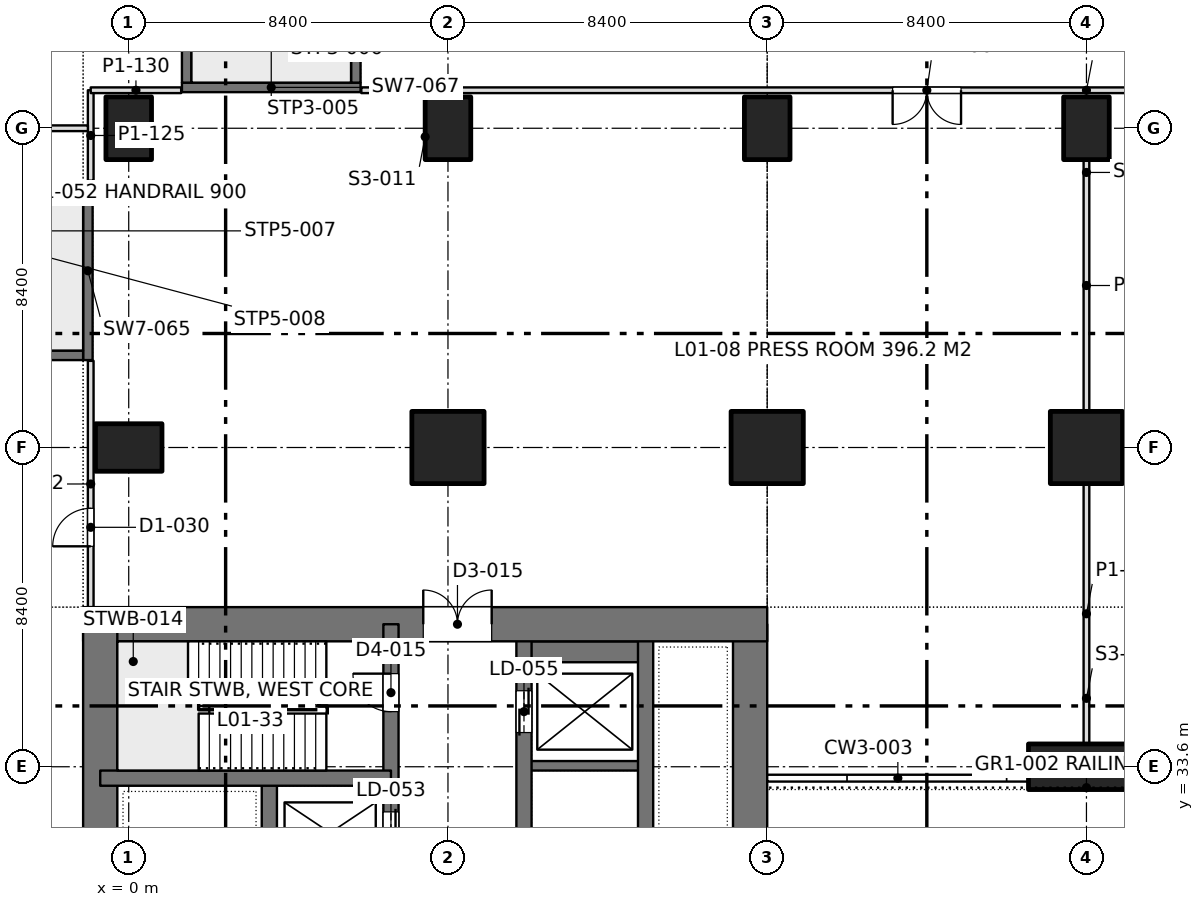
"""IFC4 building model, lengths in metres.
Left out: names, types, materials, properties, quantities, classifications, styles, units other than length and angle.
Written with IfcOpenShell. Run it as: python <this file> out.ifc"""

import sys

from ifc_helpers import new_model, si_unit, direction, frame, frame_2d, origin, origin_2d, place, context, subcontext, project, spatial, rectangle, extrude, element, fill, save


model = new_model("IFC4")
c1 = context("Model", 3, precision=1e-05, world=origin(), true_north=direction((0.0, 1.0)))
c2 = subcontext(c1, "Body", "Model", "MODEL_VIEW")
j1 = project(units=[si_unit("LENGTHUNIT", "METRE"), si_unit("PLANEANGLEUNIT", "RADIAN")], contexts=[c1])
p1 = place(None, origin())
s1 = spatial("IfcSite", under=j1, at=p1, CompositionType="ELEMENT")
p2 = place(p1, origin())
s2 = spatial("IfcBuilding", under=s1, at=p2, CompositionType="ELEMENT")
p3 = place(p2, frame((0.0, 0.0, 5.4)))
s3 = spatial("IfcBuildingStorey", under=s2, at=p3, CompositionType="ELEMENT", Elevation=5.4)
p4 = place(p3, frame((0.0, 42.0, 0.0), z_axis=(0.0, 0.0, 1.0), x_axis=(0.0, 1.0, 0.0)))
e1 = element("IfcColumn", 1, at=p4, inside=s3, PredefinedType="COLUMN", context=c2, shape_type="SweptSolid", body=[
    extrude(rectangle(XDim=1.25, YDim=1.75, at=origin_2d()), origin(), (0.0, 0.0, 1.0), 4.5),
])
p5 = place(p3, frame((0.0, 50.4, 0.0), z_axis=(0.0, 0.0, 1.0), x_axis=(1.0, 0.0, 0.0)))
e2 = element("IfcColumn", 2, at=p5, inside=s3, PredefinedType="COLUMN", context=c2, shape_type="SweptSolid", body=[
    extrude(rectangle(XDim=1.2, YDim=1.65, at=origin_2d()), origin(), (0.0, 0.0, 1.0), 4.5),
])
p6 = place(p3, frame((8.4, 42.0, 0.0), z_axis=(0.0, 0.0, 1.0), x_axis=(1.0, 0.0, 0.0)))
e3 = element("IfcColumn", 3, at=p6, inside=s3, PredefinedType="COLUMN", context=c2, shape_type="SweptSolid", body=[
    extrude(rectangle(XDim=1.9, YDim=1.9, at=origin_2d()), origin(), (0.0, 0.0, 1.0), 4.5),
])
p7 = place(p3, frame((8.4, 50.4, 0.0), z_axis=(0.0, 0.0, 1.0), x_axis=(1.0, 0.0, 0.0)))
e4 = element("IfcColumn", 4, at=p7, inside=s3, PredefinedType="COLUMN", context=c2, shape_type="SweptSolid", body=[
    extrude(rectangle(XDim=1.2, YDim=1.65, at=origin_2d()), origin(), (0.0, 0.0, 1.0), 4.5),
])
p8 = place(p3, frame((16.8, 42.0, 0.0), z_axis=(0.0, 0.0, 1.0), x_axis=(1.0, 0.0, 0.0)))
e5 = element("IfcColumn", 5, at=p8, inside=s3, PredefinedType="COLUMN", context=c2, shape_type="SweptSolid", body=[
    extrude(rectangle(XDim=1.9, YDim=1.9, at=origin_2d()), origin(), (0.0, 0.0, 1.0), 4.5),
])
p9 = place(p3, frame((16.8, 50.4, 0.0), z_axis=(0.0, 0.0, 1.0), x_axis=(1.0, 0.0, 0.0)))
e6 = element("IfcColumn", 6, at=p9, inside=s3, PredefinedType="COLUMN", context=c2, shape_type="SweptSolid", body=[
    extrude(rectangle(XDim=1.2, YDim=1.65, at=origin_2d()), origin(), (0.0, 0.0, 1.0), 4.5),
])
p10 = place(p3, frame((25.2, 42.0, 0.0), z_axis=(0.0, 0.0, 1.0), x_axis=(1.0, 0.0, 0.0)))
e7 = element("IfcColumn", 7, at=p10, inside=s3, PredefinedType="COLUMN", context=c2, shape_type="SweptSolid", body=[
    extrude(rectangle(XDim=1.9, YDim=1.9, at=origin_2d()), origin(), (0.0, 0.0, 1.0), 4.5),
])
p11 = place(p3, frame((25.2, 50.4, 0.0), z_axis=(0.0, 0.0, 1.0), x_axis=(1.0, 0.0, 0.0)))
e8 = element("IfcColumn", 8, at=p11, inside=s3, PredefinedType="COLUMN", context=c2, shape_type="SweptSolid", body=[
    extrude(rectangle(XDim=1.2, YDim=1.65, at=origin_2d()), origin(), (0.0, 0.0, 1.0), 4.5),
])
p12 = place(p3, frame((25.2, 33.6, 0.0), z_axis=(0.0, 0.0, 1.0), x_axis=(1.0, 0.0, 0.0)))
e9 = element("IfcColumn", 9, at=p12, inside=s3, PredefinedType="COLUMN", context=c2, shape_type="SweptSolid", body=[
    extrude(rectangle(XDim=3.05, YDim=1.2, at=origin_2d()), origin(), (0.0, 0.0, 1.0), 4.5),
])
p13 = place(p3, frame((-1.2, 37.35, 0.0), z_axis=(0.0, 0.0, 1.0), x_axis=(1.0, 0.0, 0.0)))
e10 = element("IfcWall", 10, at=p13, inside=s3, PredefinedType="SHEAR", context=c2, shape_type="SweptSolid", body=[
    extrude(rectangle(XDim=18.0, YDim=0.9, at=frame_2d((9.0, 0.0))), origin(), (0.0, 0.0, 1.0), 4.5),
])
p14 = place(p13, frame((8.95, 0.0, 0.0)))
e11 = element("IfcOpeningElement", 11, at=p14, cuts=e10, PredefinedType="OPENING", context=c2, shape_type="SweptSolid", body=[
    extrude(rectangle(XDim=1.8, YDim=2.4, at=frame_2d((0.9, 1.2))), frame((0.0, 0.46, 0.0), z_axis=(0.0, -1.0, 0.0), x_axis=(1.0, 0.0, 0.0)), (0.0, 0.0, 1.0), 0.92),
])
for number, where, z_axis, x_axis in (
    (12, (-0.75, 13.05, 0.0), (0.0, 0.0, 1.0), (0.0, 1.0, 0.0)),
    (13, (16.35, 13.05, 0.0), (0.0, 0.0, 1.0), (0.0, 1.0, 0.0)),
):
    element("IfcWall", number, at=place(p3, frame(where, z_axis=z_axis, x_axis=x_axis)), inside=s3, PredefinedType="SHEAR", context=c2, shape_type="SweptSolid", body=[
        extrude(rectangle(XDim=24.3, YDim=0.9, at=frame_2d((12.15, 0.0))), origin(), (0.0, 0.0, 1.0), 4.5),
    ])
p15 = place(p3, frame((6.9, 13.05, 0.0), z_axis=(0.0, 0.0, 1.0), x_axis=(0.0, 1.0, 0.0)))
e14 = element("IfcWall", 14, at=p15, inside=s3, PredefinedType="SHEAR", context=c2, shape_type="SweptSolid", body=[
    extrude(rectangle(XDim=24.3, YDim=0.4, at=frame_2d((12.15, 0.0))), origin(), (0.0, 0.0, 1.0), 4.5),
])
p16 = place(p15, frame((1.3, 0.0, 0.0)))
e15 = element("IfcOpeningElement", 15, at=p16, cuts=e14, PredefinedType="OPENING", context=c2, shape_type="SweptSolid", body=[
    extrude(rectangle(XDim=1.0, YDim=2.2, at=frame_2d((0.5, 1.1))), frame((0.0, 0.21, 0.0), z_axis=(0.0, -1.0, 0.0), x_axis=(1.0, 0.0, 0.0)), (0.0, 0.0, 1.0), 0.42),
])
p17 = place(p15, frame((22.0, 0.0, 0.0)))
e16 = element("IfcOpeningElement", 16, at=p17, cuts=e14, PredefinedType="OPENING", context=c2, shape_type="SweptSolid", body=[
    extrude(rectangle(XDim=1.0, YDim=2.2, at=frame_2d((0.5, 1.1))), frame((0.0, 0.21, 0.0), z_axis=(0.0, -1.0, 0.0), x_axis=(1.0, 0.0, 0.0)), (0.0, 0.0, 1.0), 0.42),
])
p18 = place(p15, frame((5.55, 0.0, 0.0)))
e17 = element("IfcOpeningElement", 17, at=p18, cuts=e14, PredefinedType="OPENING", context=c2, shape_type="SweptSolid", body=[
    extrude(rectangle(XDim=1.0, YDim=2.2, at=frame_2d((0.5, 1.1))), frame((0.0, 0.21, 0.0), z_axis=(0.0, -1.0, 0.0), x_axis=(1.0, 0.0, 0.0)), (0.0, 0.0, 1.0), 0.42),
])
p19 = place(p15, frame((9.55, 0.0, 0.0)))
e18 = element("IfcOpeningElement", 18, at=p19, cuts=e14, PredefinedType="OPENING", context=c2, shape_type="SweptSolid", body=[
    extrude(rectangle(XDim=1.0, YDim=2.2, at=frame_2d((0.5, 1.1))), frame((0.0, 0.21, 0.0), z_axis=(0.0, -1.0, 0.0), x_axis=(1.0, 0.0, 0.0)), (0.0, 0.0, 1.0), 0.42),
])
p20 = place(p15, frame((12.8, 0.0, 0.0)))
e19 = element("IfcOpeningElement", 19, at=p20, cuts=e14, PredefinedType="OPENING", context=c2, shape_type="SweptSolid", body=[
    extrude(rectangle(XDim=1.1, YDim=2.2, at=frame_2d((0.55, 1.1))), frame((0.0, 0.21, 0.0), z_axis=(0.0, -1.0, 0.0), x_axis=(1.0, 0.0, 0.0)), (0.0, 0.0, 1.0), 0.42),
])
p21 = place(p15, frame((15.538, 0.0, 0.0)))
e20 = element("IfcOpeningElement", 20, at=p21, cuts=e14, PredefinedType="OPENING", context=c2, shape_type="SweptSolid", body=[
    extrude(rectangle(XDim=1.1, YDim=2.2, at=frame_2d((0.55, 1.1))), frame((0.0, 0.21, 0.0), z_axis=(0.0, -1.0, 0.0), x_axis=(1.0, 0.0, 0.0)), (0.0, 0.0, 1.0), 0.42),
])
p22 = place(p15, frame((18.262, 0.0, 0.0)))
e21 = element("IfcOpeningElement", 21, at=p22, cuts=e14, PredefinedType="OPENING", context=c2, shape_type="SweptSolid", body=[
    extrude(rectangle(XDim=1.1, YDim=2.2, at=frame_2d((0.55, 1.1))), frame((0.0, 0.21, 0.0), z_axis=(0.0, -1.0, 0.0), x_axis=(1.0, 0.0, 0.0)), (0.0, 0.0, 1.0), 0.42),
])
p23 = place(p3, frame((10.4, 13.05, 0.0), z_axis=(0.0, 0.0, 1.0), x_axis=(0.0, 1.0, 0.0)))
e22 = element("IfcWall", 22, at=p23, inside=s3, PredefinedType="SHEAR", context=c2, shape_type="SweptSolid", body=[
    extrude(rectangle(XDim=24.3, YDim=0.4, at=frame_2d((12.15, 0.0))), origin(), (0.0, 0.0, 1.0), 4.5),
])
p24 = place(p23, frame((1.5, 0.0, 0.0)))
e23 = element("IfcOpeningElement", 23, at=p24, cuts=e22, PredefinedType="OPENING", context=c2, shape_type="SweptSolid", body=[
    extrude(rectangle(XDim=1.1, YDim=2.2, at=frame_2d((0.55, 1.1))), frame((0.0, 0.21, 0.0), z_axis=(0.0, -1.0, 0.0), x_axis=(1.0, 0.0, 0.0)), (0.0, 0.0, 1.0), 0.42),
])
p25 = place(p23, frame((4.35, 0.0, 0.0)))
e24 = element("IfcOpeningElement", 24, at=p25, cuts=e22, PredefinedType="OPENING", context=c2, shape_type="SweptSolid", body=[
    extrude(rectangle(XDim=1.1, YDim=2.2, at=frame_2d((0.55, 1.1))), frame((0.0, 0.21, 0.0), z_axis=(0.0, -1.0, 0.0), x_axis=(1.0, 0.0, 0.0)), (0.0, 0.0, 1.0), 0.42),
])
p26 = place(p23, frame((7.2, 0.0, 0.0)))
e25 = element("IfcOpeningElement", 25, at=p26, cuts=e22, PredefinedType="OPENING", context=c2, shape_type="SweptSolid", body=[
    extrude(rectangle(XDim=1.1, YDim=2.2, at=frame_2d((0.55, 1.1))), frame((0.0, 0.21, 0.0), z_axis=(0.0, -1.0, 0.0), x_axis=(1.0, 0.0, 0.0)), (0.0, 0.0, 1.0), 0.42),
])
p27 = place(p23, frame((21.45, 0.0, 0.0)))
e26 = element("IfcOpeningElement", 26, at=p27, cuts=e22, PredefinedType="OPENING", context=c2, shape_type="SweptSolid", body=[
    extrude(rectangle(XDim=1.1, YDim=2.2, at=frame_2d((0.55, 1.1))), frame((0.0, 0.21, 0.0), z_axis=(0.0, -1.0, 0.0), x_axis=(1.0, 0.0, 0.0)), (0.0, 0.0, 1.0), 0.42),
])
p28 = place(p3, frame((13.6, 13.05, 0.0), z_axis=(0.0, 0.0, 1.0), x_axis=(0.0, 1.0, 0.0)))
e27 = element("IfcWall", 27, at=p28, inside=s3, PredefinedType="SHEAR", context=c2, shape_type="SweptSolid", body=[
    extrude(rectangle(XDim=24.3, YDim=0.4, at=frame_2d((12.15, 0.0))), origin(), (0.0, 0.0, 1.0), 4.5),
])
p29 = place(p3, frame((-0.75, 33.3, 0.0), z_axis=(0.0, 0.0, 1.0), x_axis=(1.0, 0.0, 0.0)))
e28 = element("IfcWall", 28, at=p29, inside=s3, PredefinedType="SHEAR", context=c2, shape_type="SweptSolid", body=[
    extrude(rectangle(XDim=7.65, YDim=0.4, at=frame_2d((3.825, 0.0))), origin(), (0.0, 0.0, 1.0), 4.5),
])
p30 = place(p3, frame((3.7, 27.7, 0.0), z_axis=(0.0, 0.0, 1.0), x_axis=(0.0, 1.0, 0.0)))
e29 = element("IfcWall", 29, at=p30, inside=s3, PredefinedType="SHEAR", context=c2, shape_type="SweptSolid", body=[
    extrude(rectangle(XDim=5.6, YDim=0.4, at=frame_2d((2.8, 0.0))), origin(), (0.0, 0.0, 1.0), 4.5),
])
p31 = place(p3, frame((10.4, 33.625, 0.0), z_axis=(0.0, 0.0, 1.0), x_axis=(1.0, 0.0, 0.0)))
e30 = element("IfcWall", 30, at=p31, inside=s3, PredefinedType="SHEAR", context=c2, shape_type="SweptSolid", body=[
    extrude(rectangle(XDim=3.2, YDim=0.25, at=frame_2d((1.6, 0.0))), origin(), (0.0, 0.0, 1.0), 4.5),
])
p32 = place(p3, frame((10.4, 36.625, 0.0), z_axis=(0.0, 0.0, 1.0), x_axis=(1.0, 0.0, 0.0)))
e31 = element("IfcWall", 31, at=p32, inside=s3, PredefinedType="SHEAR", context=c2, shape_type="SweptSolid", body=[
    extrude(rectangle(XDim=3.2, YDim=0.55, at=frame_2d((1.6, 0.0))), origin(), (0.0, 0.0, 1.0), 4.5),
])
p33 = place(p3, frame((-1.0, 51.4, 0.0), z_axis=(0.0, 0.0, 1.0), x_axis=(1.0, 0.0, 0.0)))
e32 = element("IfcWall", 32, at=p33, inside=s3, PredefinedType="PARTITIONING", context=c2, shape_type="SweptSolid", body=[
    extrude(rectangle(XDim=2.38, YDim=0.15, at=frame_2d((1.19, 0.0))), origin(), (0.0, 0.0, 1.0), 3.7),
])
p34 = place(p3, frame((6.12, 51.4, 0.0), z_axis=(0.0, 0.0, 1.0), x_axis=(1.0, 0.0, 0.0)))
e33 = element("IfcWall", 33, at=p34, inside=s3, PredefinedType="PARTITIONING", context=c2, shape_type="SweptSolid", body=[
    extrude(rectangle(XDim=38.16, YDim=0.15, at=frame_2d((19.08, 0.0))), origin(), (0.0, 0.0, 1.0), 3.7),
])
p35 = place(p34, frame((13.98, 0.0, 0.0)))
e34 = element("IfcOpeningElement", 34, at=p35, cuts=e33, PredefinedType="OPENING", context=c2, shape_type="SweptSolid", body=[
    extrude(rectangle(XDim=1.8, YDim=2.2, at=frame_2d((0.9, 1.1))), frame((0.0, 0.085, 0.0), z_axis=(0.0, -1.0, 0.0), x_axis=(1.0, 0.0, 0.0)), (0.0, 0.0, 1.0), 0.17),
])
p36 = place(p34, frame((22.38, 0.0, 0.0)))
e35 = element("IfcOpeningElement", 35, at=p36, cuts=e33, PredefinedType="OPENING", context=c2, shape_type="SweptSolid", body=[
    extrude(rectangle(XDim=1.8, YDim=2.2, at=frame_2d((0.9, 1.1))), frame((0.0, 0.085, 0.0), z_axis=(0.0, -1.0, 0.0), x_axis=(1.0, 0.0, 0.0)), (0.0, 0.0, 1.0), 0.17),
])
p37 = place(p3, frame((-8.001, 50.4, 0.0), z_axis=(0.0, 0.0, 1.0), x_axis=(1.0, 0.0, 0.0)))
e36 = element("IfcWall", 36, at=p37, inside=s3, PredefinedType="PARTITIONING", context=c2, shape_type="SweptSolid", body=[
    extrude(rectangle(XDim=6.927, YDim=0.15, at=frame_2d((3.463, 0.0))), origin(), (0.0, 0.0, 1.0), 3.7),
])
p38 = place(p37, frame((2.501, 0.0, 0.0)))
e37 = element("IfcOpeningElement", 37, at=p38, cuts=e36, PredefinedType="OPENING", context=c2, shape_type="SweptSolid", body=[
    extrude(rectangle(XDim=1.0, YDim=2.2, at=frame_2d((0.5, 1.1))), frame((0.0, 0.085, 0.0), z_axis=(0.0, -1.0, 0.0), x_axis=(1.0, 0.0, 0.0)), (0.0, 0.0, 1.0), 0.17),
])
p39 = place(p3, frame((-1.0, 37.8, 0.0), z_axis=(0.0, 0.0, 1.0), x_axis=(0.0, 1.0, 0.0)))
e38 = element("IfcWall", 38, at=p39, inside=s3, PredefinedType="PARTITIONING", context=c2, shape_type="SweptSolid", body=[
    extrude(rectangle(XDim=6.48, YDim=0.15, at=frame_2d((3.24, 0.0))), origin(), (0.0, 0.0, 1.0), 3.7),
])
p40 = place(p39, frame((1.6, 0.0, 0.0)))
e39 = element("IfcOpeningElement", 39, at=p40, cuts=e38, PredefinedType="OPENING", context=c2, shape_type="SweptSolid", body=[
    extrude(rectangle(XDim=1.0, YDim=2.2, at=frame_2d((0.5, 1.1))), frame((0.0, 0.085, 0.0), z_axis=(0.0, -1.0, 0.0), x_axis=(1.0, 0.0, 0.0)), (0.0, 0.0, 1.0), 0.17),
])
p41 = place(p3, frame((-1.0, 49.02, 0.0), z_axis=(0.0, 0.0, 1.0), x_axis=(0.0, 1.0, 0.0)))
e40 = element("IfcWall", 40, at=p41, inside=s3, PredefinedType="PARTITIONING", context=c2, shape_type="SweptSolid", body=[
    extrude(rectangle(XDim=2.38, YDim=0.15, at=frame_2d((1.19, 0.0))), origin(), (0.0, 0.0, 1.0), 3.7),
])
p42 = place(p3, frame((25.2, 34.199, 0.0), z_axis=(0.0, 0.0, 1.0), x_axis=(0.0, 1.0, 0.0)))
e41 = element("IfcWall", 41, at=p42, inside=s3, PredefinedType="PARTITIONING", context=c2, shape_type="SweptSolid", body=[
    extrude(rectangle(XDim=6.852, YDim=0.15, at=frame_2d((3.426, 0.0))), origin(), (0.0, 0.0, 1.0), 3.7),
])
p43 = place(p3, frame((25.2, 42.949, 0.0), z_axis=(0.0, 0.0, 1.0), x_axis=(0.0, 1.0, 0.0)))
e42 = element("IfcWall", 42, at=p43, inside=s3, PredefinedType="PARTITIONING", context=c2, shape_type="SweptSolid", body=[
    extrude(rectangle(XDim=6.627, YDim=0.15, at=frame_2d((3.313, 0.0))), origin(), (0.0, 0.0, 1.0), 3.7),
])
p44 = place(p3, frame((1.525, 59.702, 0.0), z_axis=(0.0, 0.0, 1.0), x_axis=(0.0, -1.0, 0.0)))
e43 = element("IfcWall", 43, at=p44, inside=s3, PredefinedType="SOLIDWALL", context=c2, shape_type="SweptSolid", body=[
    extrude(rectangle(XDim=8.102, YDim=0.25, at=frame_2d((4.051, 0.0))), origin(), (0.0, 0.0, 1.0), 4.5),
])
p45 = place(p3, frame((5.975, 59.702, 0.0), z_axis=(0.0, 0.0, 1.0), x_axis=(0.0, -1.0, 0.0)))
e44 = element("IfcWall", 44, at=p45, inside=s3, PredefinedType="SOLIDWALL", context=c2, shape_type="SweptSolid", body=[
    extrude(rectangle(XDim=8.102, YDim=0.25, at=frame_2d((4.051, 0.0))), origin(), (0.0, 0.0, 1.0), 4.5),
])
p46 = place(p45, frame((0.15, 0.0, 0.0)))
e45 = element("IfcOpeningElement", 45, at=p46, cuts=e44, PredefinedType="OPENING", context=c2, shape_type="SweptSolid", body=[
    extrude(rectangle(XDim=2.0, YDim=2.2, at=frame_2d((1.0, 1.1))), frame((0.0, 0.135, 0.0), z_axis=(0.0, -1.0, 0.0), x_axis=(1.0, 0.0, 0.0)), (0.0, 0.0, 1.0), 0.27),
])
p47 = place(p3, frame((1.4, 51.475, 0.0), z_axis=(0.0, 0.0, 1.0), x_axis=(1.0, 0.0, 0.0)))
e46 = element("IfcWall", 46, at=p47, inside=s3, PredefinedType="SOLIDWALL", context=c2, shape_type="SweptSolid", body=[
    extrude(rectangle(XDim=4.7, YDim=0.25, at=frame_2d((2.35, 0.0))), origin(), (0.0, 0.0, 1.0), 4.5),
])
p48 = place(p3, frame((-9.302, 44.425, 0.0), z_axis=(0.0, 0.0, 1.0), x_axis=(1.0, 0.0, 0.0)))
e47 = element("IfcWall", 47, at=p48, inside=s3, PredefinedType="SOLIDWALL", context=c2, shape_type="SweptSolid", body=[
    extrude(rectangle(XDim=8.102, YDim=0.25, at=frame_2d((4.051, 0.0))), origin(), (0.0, 0.0, 1.0), 4.5),
])
p49 = place(p48, frame((0.15, 0.0, 0.0)))
e48 = element("IfcOpeningElement", 48, at=p49, cuts=e47, PredefinedType="OPENING", context=c2, shape_type="SweptSolid", body=[
    extrude(rectangle(XDim=2.0, YDim=2.2, at=frame_2d((1.0, 1.1))), frame((0.0, 0.135, 0.0), z_axis=(0.0, -1.0, 0.0), x_axis=(1.0, 0.0, 0.0)), (0.0, 0.0, 1.0), 0.27),
])
p50 = place(p3, frame((-9.302, 48.875, 0.0), z_axis=(0.0, 0.0, 1.0), x_axis=(1.0, 0.0, 0.0)))
e49 = element("IfcWall", 49, at=p50, inside=s3, PredefinedType="SOLIDWALL", context=c2, shape_type="SweptSolid", body=[
    extrude(rectangle(XDim=8.102, YDim=0.25, at=frame_2d((4.051, 0.0))), origin(), (0.0, 0.0, 1.0), 4.5),
])
p51 = place(p3, frame((-1.075, 44.3, 0.0), z_axis=(0.0, 0.0, 1.0), x_axis=(0.0, 1.0, 0.0)))
e50 = element("IfcWall", 50, at=p51, inside=s3, PredefinedType="SOLIDWALL", context=c2, shape_type="SweptSolid", body=[
    extrude(rectangle(XDim=4.7, YDim=0.25, at=frame_2d((2.35, 0.0))), origin(), (0.0, 0.0, 1.0), 4.5),
])
p52 = place(p14, origin())
e51 = element("IfcDoor", 51, at=p52, inside=s3, OperationType="DOUBLE_DOOR_SINGLE_SWING", PredefinedType="DOOR", context=c2, shape_type="SweptSolid", body=[
    extrude(rectangle(XDim=1.8, YDim=2.4, at=frame_2d((0.9, 1.2))), frame((0.0, 0.025, 0.0), z_axis=(0.0, -1.0, 0.0), x_axis=(1.0, 0.0, 0.0)), (0.0, 0.0, 1.0), 0.05),
])
fill(e11, e51)
p53 = place(p17, origin())
e52 = element("IfcDoor", 52, at=p53, inside=s3, OperationType="SINGLE_SWING_RIGHT", PredefinedType="DOOR", context=c2, shape_type="SweptSolid", body=[
    extrude(rectangle(XDim=1.0, YDim=2.2, at=frame_2d((0.5, 1.1))), frame((0.0, 0.025, 0.0), z_axis=(0.0, -1.0, 0.0), x_axis=(1.0, 0.0, 0.0)), (0.0, 0.0, 1.0), 0.05),
])
fill(e16, e52)
p54 = place(p27, origin())
e53 = element("IfcDoor", 53, at=p54, inside=s3, OperationType="DOUBLE_DOOR_SLIDING", PredefinedType="DOOR", context=c2, shape_type="SweptSolid", body=[
    extrude(rectangle(XDim=1.1, YDim=2.2, at=frame_2d((0.55, 1.1))), frame((0.0, 0.025, 0.0), z_axis=(0.0, -1.0, 0.0), x_axis=(1.0, 0.0, 0.0)), (0.0, 0.0, 1.0), 0.05),
])
fill(e26, e53)
p55 = place(p22, origin())
e54 = element("IfcDoor", 54, at=p55, inside=s3, OperationType="DOUBLE_DOOR_SLIDING", PredefinedType="DOOR", context=c2, shape_type="SweptSolid", body=[
    extrude(rectangle(XDim=1.1, YDim=2.2, at=frame_2d((0.55, 1.1))), frame((0.0, 0.025, 0.0), z_axis=(0.0, -1.0, 0.0), x_axis=(1.0, 0.0, 0.0)), (0.0, 0.0, 1.0), 0.05),
])
fill(e21, e54)
p56 = place(p35, frame((1.8, 0.0, 0.0), z_axis=(0.0, 0.0, 1.0), x_axis=(-1.0, 0.0, 0.0)))
e55 = element("IfcDoor", 55, at=p56, inside=s3, OperationType="DOUBLE_DOOR_SINGLE_SWING", PredefinedType="DOOR", context=c2, shape_type="SweptSolid", body=[
    extrude(rectangle(XDim=1.8, YDim=2.2, at=frame_2d((0.9, 1.1))), frame((0.0, 0.025, 0.0), z_axis=(0.0, -1.0, 0.0), x_axis=(1.0, 0.0, 0.0)), (0.0, 0.0, 1.0), 0.05),
])
fill(e34, e55)
p57 = place(p40, origin())
e56 = element("IfcDoor", 56, at=p57, inside=s3, OperationType="SINGLE_SWING_LEFT", PredefinedType="DOOR", context=c2, shape_type="SweptSolid", body=[
    extrude(rectangle(XDim=1.0, YDim=2.2, at=frame_2d((0.5, 1.1))), frame((0.0, 0.025, 0.0), z_axis=(0.0, -1.0, 0.0), x_axis=(1.0, 0.0, 0.0)), (0.0, 0.0, 1.0), 0.05),
])
fill(e39, e56)
save(model, sys.argv[1])
